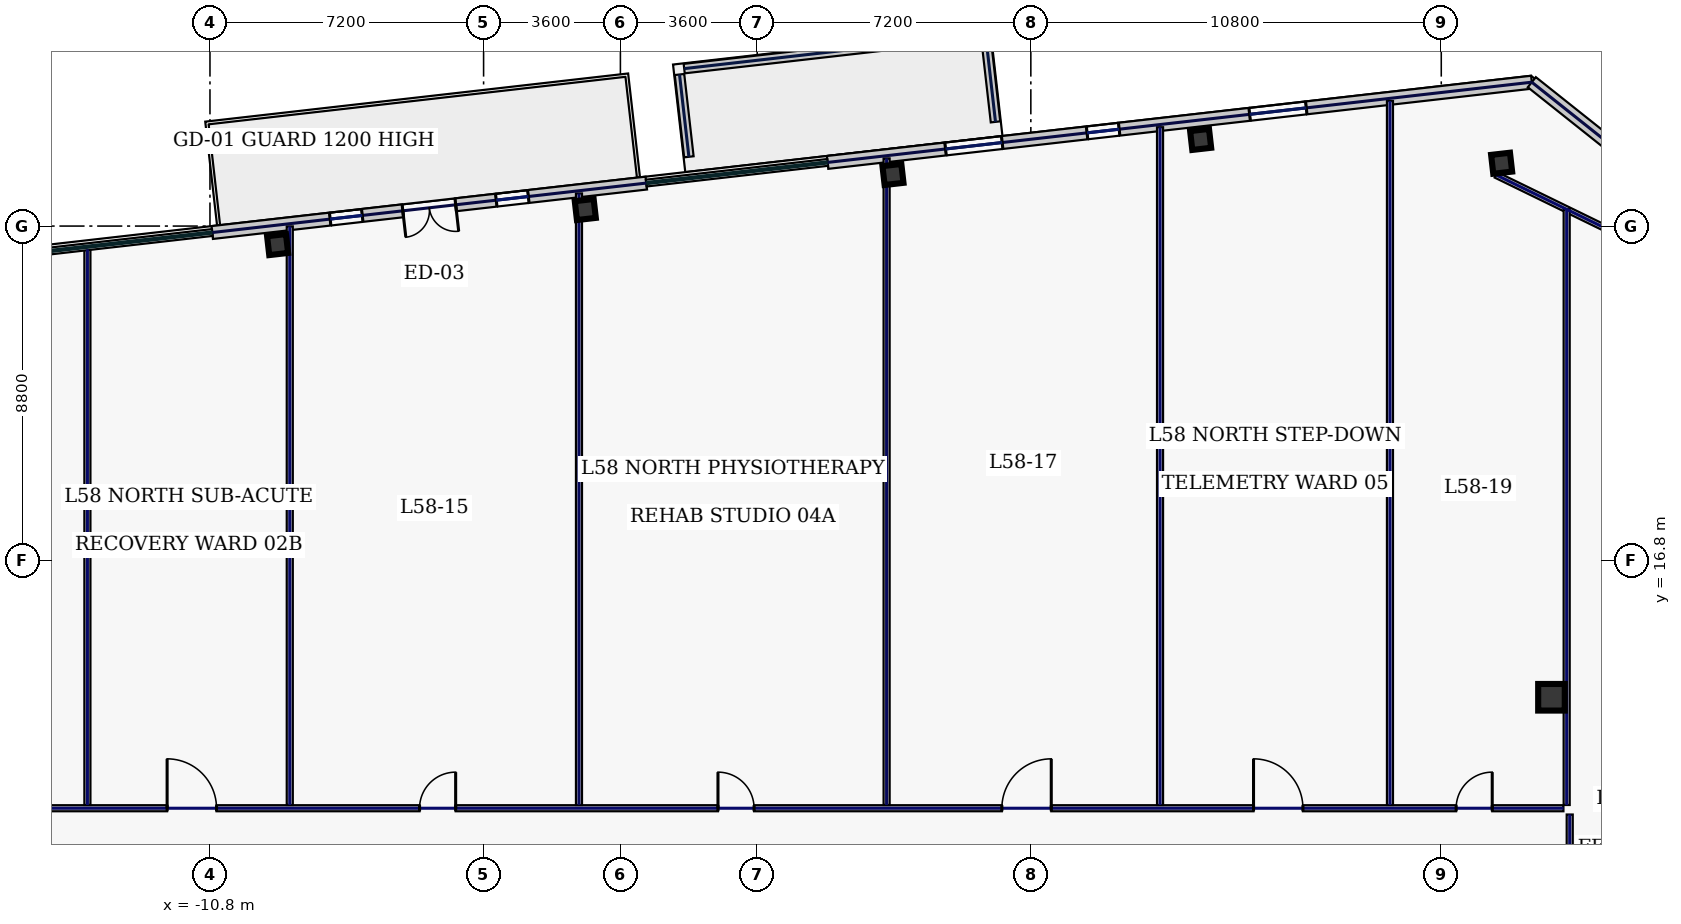
"""IFC4 building model, lengths in metres.
Left out: names, types, materials, properties, quantities, classifications, styles, units other than length and angle.
Written with IfcOpenShell. Run it as: python <this file> out.ifc"""

import sys

from ifc_helpers import new_model, si_unit, direction, frame, frame_2d, origin, origin_2d, place, context, subcontext, project, spatial, rectangle, hollow_rectangle, extrude, element, fill, save


model = new_model("IFC4")
c1 = context("Model", 3, precision=1e-05, world=origin(), true_north=direction((0.0, 1.0)))
c2 = subcontext(c1, "Body", "Model", "MODEL_VIEW")
j1 = project(units=[si_unit("LENGTHUNIT", "METRE"), si_unit("PLANEANGLEUNIT", "RADIAN")], contexts=[c1])
p1 = place(None, origin())
s1 = spatial("IfcSite", under=j1, at=p1, CompositionType="ELEMENT")
p2 = place(p1, origin())
s2 = spatial("IfcBuilding", under=s1, at=p2, CompositionType="ELEMENT")
p3 = place(p2, frame((0.0, 0.0, 251.0)))
s3 = spatial("IfcBuildingStorey", under=s2, at=p3, CompositionType="ELEMENT", Elevation=251.0)
p4 = place(p3, frame((24.5, 13.2, 0.0), z_axis=(0.0, 0.0, 1.0), x_axis=(1.0, 0.0, 0.0)))
e1 = element("IfcColumn", 1, at=p4, inside=s3, PredefinedType="COLUMN", context=c2, shape_type="SweptSolid", body=[
    extrude(hollow_rectangle(XDim=0.7, YDim=0.7, WallThickness=0.032, at=origin_2d()), origin(), (0.0, 0.0, 1.0), 3.74),
])
for number, where, z_axis, x_axis in (
    (2, (23.188, 27.253, 0.0), (0.0, 0.0, 1.0), (0.994, 0.113, 0.0)),
    (3, (15.269, 27.88, 0.0), (0.0, 0.0, 1.0), (0.994, 0.113, 0.0)),
    (4, (7.172, 26.958, 0.0), (0.0, 0.0, 1.0), (0.994, 0.113, 0.0)),
    (5, (-0.924, 26.035, 0.0), (0.0, 0.0, 1.0), (0.994, 0.113, 0.0)),
    (6, (-9.02, 25.113, 0.0), (0.0, 0.0, 1.0), (0.994, 0.113, 0.0)),
):
    element("IfcColumn", number, at=place(p3, frame(where, z_axis=z_axis, x_axis=x_axis)), inside=s3, PredefinedType="COLUMN", context=c2, shape_type="SweptSolid", body=[
        extrude(hollow_rectangle(XDim=0.5, YDim=0.5, WallThickness=0.025, at=origin_2d()), origin(), (0.0, 0.0, 1.0), 3.74),
    ])
p5 = place(p3, frame((1.802, 27.423, 0.0), z_axis=(0.0, 0.0, 1.0), x_axis=(-0.113221265394, 0.993569798787, 0.0)))
e7 = element("IfcWall", 7, at=p5, inside=s3, PredefinedType="PARAPET", context=c2, shape_type="SweptSolid", body=[
    extrude(rectangle(XDim=2.18, YDim=0.25, at=frame_2d((1.09, 0.0))), origin(), (0.0, 0.0, 1.0), 1.15),
])
p6 = place(p3, frame((1.679, 29.744, 0.0), z_axis=(0.0, 0.0, 1.0), x_axis=(0.993573058551, 0.113192655776, 0.0)))
e8 = element("IfcWall", 8, at=p6, inside=s3, PredefinedType="PARAPET", context=c2, shape_type="SweptSolid", body=[
    extrude(rectangle(XDim=7.84, YDim=0.25, at=frame_2d((3.92, 0.0))), origin(), (0.0, 0.0, 1.0), 1.15),
])
p7 = place(p3, frame((9.623, 30.508, 0.0), z_axis=(0.0, 0.0, 1.0), x_axis=(0.113221265394, -0.993569798787, 0.0)))
e9 = element("IfcWall", 9, at=p7, inside=s3, PredefinedType="PARAPET", context=c2, shape_type="SweptSolid", body=[
    extrude(rectangle(XDim=2.18, YDim=0.25, at=frame_2d((1.09, 0.0))), origin(), (0.0, 0.0, 1.0), 1.15),
])
p8 = place(p3, frame((23.983, 29.386, 0.0), z_axis=(0.0, 0.0, 1.0), x_axis=(-0.993572271362, -0.113199565282, 0.0)))
e10 = element("IfcWall", 10, at=p8, inside=s3, PredefinedType="STANDARD", context=c2, shape_type="SweptSolid", body=[
    extrude(rectangle(XDim=18.651, YDim=0.34, at=frame_2d((9.326, 0.0))), origin(), (0.0, 0.0, 1.0), 3.74),
])
p9 = place(p8, frame((14.027, 0.0, 0.83)))
e11 = element("IfcOpeningElement", 11, at=p9, cuts=e10, PredefinedType="OPENING", context=c2, shape_type="SweptSolid", body=[
    extrude(rectangle(XDim=1.5, YDim=2.0, at=frame_2d((0.75, 1.0))), frame((0.0, 0.18, 0.0), z_axis=(0.0, -1.0, 0.0), x_axis=(1.0, 0.0, 0.0)), (0.0, 0.0, 1.0), 0.36),
])
p10 = place(p8, frame((10.929, 0.0, 0.83)))
e12 = element("IfcOpeningElement", 12, at=p10, cuts=e10, PredefinedType="OPENING", context=c2, shape_type="SweptSolid", body=[
    extrude(rectangle(XDim=0.85, YDim=1.85, at=frame_2d((0.425, 0.925))), frame((0.0, 0.18, 0.0), z_axis=(0.0, -1.0, 0.0), x_axis=(1.0, 0.0, 0.0)), (0.0, 0.0, 1.0), 0.36),
])
p11 = place(p8, frame((5.973, 0.0, 0.83)))
e13 = element("IfcOpeningElement", 13, at=p11, cuts=e10, PredefinedType="OPENING", context=c2, shape_type="SweptSolid", body=[
    extrude(rectangle(XDim=1.5, YDim=2.0, at=frame_2d((0.75, 1.0))), frame((0.0, 0.18, 0.0), z_axis=(0.0, -1.0, 0.0), x_axis=(1.0, 0.0, 0.0)), (0.0, 0.0, 1.0), 0.36),
])
p12 = place(p3, frame((0.682, 26.731, 0.0), z_axis=(0.0, 0.0, 1.0), x_axis=(-0.993571968199, -0.113202226169, 0.0)))
e14 = element("IfcWall", 14, at=p12, inside=s3, PredefinedType="STANDARD", context=c2, shape_type="SweptSolid", body=[
    extrude(rectangle(XDim=11.497, YDim=0.34, at=frame_2d((5.749, 0.0))), origin(), (0.0, 0.0, 1.0), 3.74),
])
p13 = place(p12, frame((5.049, 0.0, 0.0)))
e15 = element("IfcOpeningElement", 15, at=p13, cuts=e14, PredefinedType="OPENING", context=c2, shape_type="SweptSolid", body=[
    extrude(rectangle(XDim=1.4, YDim=2.2, at=frame_2d((0.7, 1.1))), frame((0.0, 0.18, 0.0), z_axis=(0.0, -1.0, 0.0), x_axis=(1.0, 0.0, 0.0)), (0.0, 0.0, 1.0), 0.36),
])
p14 = place(p12, frame((7.523, 0.0, 0.83)))
e16 = element("IfcOpeningElement", 16, at=p14, cuts=e14, PredefinedType="OPENING", context=c2, shape_type="SweptSolid", body=[
    extrude(rectangle(XDim=0.85, YDim=1.85, at=frame_2d((0.425, 0.925))), frame((0.0, 0.18, 0.0), z_axis=(0.0, -1.0, 0.0), x_axis=(1.0, 0.0, 0.0)), (0.0, 0.0, 1.0), 0.36),
])
p15 = place(p12, frame((3.125, 0.0, 0.83)))
e17 = element("IfcOpeningElement", 17, at=p15, cuts=e14, PredefinedType="OPENING", context=c2, shape_type="SweptSolid", body=[
    extrude(rectangle(XDim=0.85, YDim=1.85, at=frame_2d((0.425, 0.925))), frame((0.0, 0.18, 0.0), z_axis=(0.0, -1.0, 0.0), x_axis=(1.0, 0.0, 0.0)), (0.0, 0.0, 1.0), 0.36),
])
p16 = place(p3, frame((29.107, 25.31, 0.0), z_axis=(0.0, 0.0, 1.0), x_axis=(-0.78259733853, 0.62252823689, 0.0)))
e18 = element("IfcWall", 18, at=p16, inside=s3, PredefinedType="STANDARD", context=c2, shape_type="SweptSolid", body=[
    extrude(rectangle(XDim=6.548, YDim=0.34, at=frame_2d((3.274, 0.0))), origin(), (0.0, 0.0, 1.0), 3.74),
])
p17 = place(p3, frame((28.528, 24.271, 0.0), z_axis=(0.0, 0.0, 1.0), x_axis=(-0.898820692789, 0.438316509173, 0.0)))
e19 = element("IfcWall", 19, at=p17, inside=s3, PredefinedType="PARTITIONING", context=c2, shape_type="SweptSolid", body=[
    extrude(rectangle(XDim=6.107, YDim=0.16, at=frame_2d((3.053, 0.0))), origin(), (0.0, 0.0, 1.0), 3.74),
])
p18 = place(p3, frame((-24.815, 10.28, 0.0), z_axis=(0.0, 0.0, 1.0), x_axis=(1.0, 0.0, 0.0)))
e20 = element("IfcWall", 20, at=p18, inside=s3, PredefinedType="PARTITIONING", context=c2, shape_type="SweptSolid", body=[
    extrude(rectangle(XDim=49.63, YDim=0.16, at=frame_2d((24.815, 0.0))), origin(), (0.0, 0.0, 1.0), 3.74),
])
p19 = place(p18, frame((1.869, 0.0, 0.0)))
e21 = element("IfcOpeningElement", 21, at=p19, cuts=e20, PredefinedType="OPENING", context=c2, shape_type="SweptSolid", body=[
    extrude(rectangle(XDim=1.3, YDim=2.2, at=frame_2d((0.65, 1.1))), frame((0.0, 0.09, 0.0), z_axis=(0.0, -1.0, 0.0), x_axis=(1.0, 0.0, 0.0)), (0.0, 0.0, 1.0), 0.18),
])
p20 = place(p18, frame((7.288, 0.0, 0.0)))
e22 = element("IfcOpeningElement", 22, at=p20, cuts=e20, PredefinedType="OPENING", context=c2, shape_type="SweptSolid", body=[
    extrude(rectangle(XDim=1.05, YDim=2.2, at=frame_2d((0.525, 1.1))), frame((0.0, 0.09, 0.0), z_axis=(0.0, -1.0, 0.0), x_axis=(1.0, 0.0, 0.0)), (0.0, 0.0, 1.0), 0.18),
])
p21 = place(p18, frame((12.887, 0.0, 0.0)))
e23 = element("IfcOpeningElement", 23, at=p21, cuts=e20, PredefinedType="OPENING", context=c2, shape_type="SweptSolid", body=[
    extrude(rectangle(XDim=1.3, YDim=2.2, at=frame_2d((0.65, 1.1))), frame((0.0, 0.09, 0.0), z_axis=(0.0, -1.0, 0.0), x_axis=(1.0, 0.0, 0.0)), (0.0, 0.0, 1.0), 0.18),
])
p22 = place(p18, frame((19.53, 0.0, 0.0)))
e24 = element("IfcOpeningElement", 24, at=p22, cuts=e20, PredefinedType="OPENING", context=c2, shape_type="SweptSolid", body=[
    extrude(rectangle(XDim=0.95, YDim=2.2, at=frame_2d((0.475, 1.1))), frame((0.0, 0.09, 0.0), z_axis=(0.0, -1.0, 0.0), x_axis=(1.0, 0.0, 0.0)), (0.0, 0.0, 1.0), 0.18),
])
p23 = place(p18, frame((27.383, 0.0, 0.0)))
e25 = element("IfcOpeningElement", 25, at=p23, cuts=e20, PredefinedType="OPENING", context=c2, shape_type="SweptSolid", body=[
    extrude(rectangle(XDim=0.95, YDim=2.2, at=frame_2d((0.475, 1.1))), frame((0.0, 0.09, 0.0), z_axis=(0.0, -1.0, 0.0), x_axis=(1.0, 0.0, 0.0)), (0.0, 0.0, 1.0), 0.18),
])
p24 = place(p18, frame((34.853, 0.0, 0.0)))
e26 = element("IfcOpeningElement", 26, at=p24, cuts=e20, PredefinedType="OPENING", context=c2, shape_type="SweptSolid", body=[
    extrude(rectangle(XDim=1.3, YDim=2.2, at=frame_2d((0.65, 1.1))), frame((0.0, 0.09, 0.0), z_axis=(0.0, -1.0, 0.0), x_axis=(1.0, 0.0, 0.0)), (0.0, 0.0, 1.0), 0.18),
])
p25 = place(p18, frame((41.475, 0.0, 0.0)))
e27 = element("IfcOpeningElement", 27, at=p25, cuts=e20, PredefinedType="OPENING", context=c2, shape_type="SweptSolid", body=[
    extrude(rectangle(XDim=1.3, YDim=2.2, at=frame_2d((0.65, 1.1))), frame((0.0, 0.09, 0.0), z_axis=(0.0, -1.0, 0.0), x_axis=(1.0, 0.0, 0.0)), (0.0, 0.0, 1.0), 0.18),
])
p26 = place(p18, frame((46.806, 0.0, 0.0)))
e28 = element("IfcOpeningElement", 28, at=p26, cuts=e20, PredefinedType="OPENING", context=c2, shape_type="SweptSolid", body=[
    extrude(rectangle(XDim=0.95, YDim=2.2, at=frame_2d((0.475, 1.1))), frame((0.0, 0.09, 0.0), z_axis=(0.0, -1.0, 0.0), x_axis=(1.0, 0.0, 0.0)), (0.0, 0.0, 1.0), 0.18),
])
p27 = place(p3, frame((24.98, 10.115, 0.0), z_axis=(0.0, 0.0, 1.0), x_axis=(0.0, -1.0, 0.0)))
e29 = element("IfcWall", 29, at=p27, inside=s3, PredefinedType="PARTITIONING", context=c2, shape_type="SweptSolid", body=[
    extrude(rectangle(XDim=20.13, YDim=0.16, at=frame_2d((10.065, 0.0))), origin(), (0.0, 0.0, 1.0), 3.74),
])
p28 = place(p27, frame((17.181, 0.0, 0.0)))
e30 = element("IfcOpeningElement", 30, at=p28, cuts=e29, PredefinedType="OPENING", context=c2, shape_type="SweptSolid", body=[
    extrude(rectangle(XDim=0.95, YDim=2.2, at=frame_2d((0.475, 1.1))), frame((0.0, 0.09, 0.0), z_axis=(0.0, -1.0, 0.0), x_axis=(1.0, 0.0, 0.0)), (0.0, 0.0, 1.0), 0.18),
])
p29 = place(p27, frame((12.325, 0.0, 0.0)))
e31 = element("IfcOpeningElement", 31, at=p29, cuts=e29, PredefinedType="OPENING", context=c2, shape_type="SweptSolid", body=[
    extrude(rectangle(XDim=0.95, YDim=2.2, at=frame_2d((0.475, 1.1))), frame((0.0, 0.09, 0.0), z_axis=(0.0, -1.0, 0.0), x_axis=(1.0, 0.0, 0.0)), (0.0, 0.0, 1.0), 0.18),
])
p30 = place(p27, frame((7.125, 0.0, 0.0)))
e32 = element("IfcOpeningElement", 32, at=p30, cuts=e29, PredefinedType="OPENING", context=c2, shape_type="SweptSolid", body=[
    extrude(rectangle(XDim=0.95, YDim=2.2, at=frame_2d((0.475, 1.1))), frame((0.0, 0.09, 0.0), z_axis=(0.0, -1.0, 0.0), x_axis=(1.0, 0.0, 0.0)), (0.0, 0.0, 1.0), 0.18),
])
p31 = place(p27, frame((2.219, 0.0, 0.0)))
e33 = element("IfcOpeningElement", 33, at=p31, cuts=e29, PredefinedType="OPENING", context=c2, shape_type="SweptSolid", body=[
    extrude(rectangle(XDim=0.95, YDim=2.2, at=frame_2d((0.475, 1.1))), frame((0.0, 0.09, 0.0), z_axis=(0.0, -1.0, 0.0), x_axis=(1.0, 0.0, 0.0)), (0.0, 0.0, 1.0), 0.18),
])
p32 = place(p3, frame((24.9, 10.365, 0.0), z_axis=(0.0, 0.0, 1.0), x_axis=(0.0, 1.0, 0.0)))
e34 = element("IfcWall", 34, at=p32, inside=s3, PredefinedType="PARTITIONING", context=c2, shape_type="SweptSolid", body=[
    extrude(rectangle(XDim=15.679, YDim=0.16, at=frame_2d((7.84, 0.0))), origin(), (0.0, 0.0, 1.0), 3.74),
])
p33 = place(p3, frame((-8.7, 10.365, 0.0), z_axis=(0.0, 0.0, 1.0), x_axis=(0.0, 1.0, 0.0)))
e35 = element("IfcWall", 35, at=p33, inside=s3, PredefinedType="PARTITIONING", context=c2, shape_type="SweptSolid", body=[
    extrude(rectangle(XDim=15.227, YDim=0.16, at=frame_2d((7.614, 0.0))), origin(), (0.0, 0.0, 1.0), 3.74),
])
p34 = place(p3, frame((-1.09, 10.365, 0.0), z_axis=(0.0, 0.0, 1.0), x_axis=(0.0, 1.0, 0.0)))
e36 = element("IfcWall", 36, at=p34, inside=s3, PredefinedType="PARTITIONING", context=c2, shape_type="SweptSolid", body=[
    extrude(rectangle(XDim=16.094, YDim=0.16, at=frame_2d((8.047, 0.0))), origin(), (0.0, 0.0, 1.0), 3.285),
])
p35 = place(p3, frame((14.2, 10.365, 0.0), z_axis=(0.0, 0.0, 1.0), x_axis=(0.0, 1.0, 0.0)))
e37 = element("IfcWall", 37, at=p35, inside=s3, PredefinedType="PARTITIONING", context=c2, shape_type="SweptSolid", body=[
    extrude(rectangle(XDim=17.836, YDim=0.16, at=frame_2d((8.918, 0.0))), origin(), (0.0, 0.0, 1.0), 3.74),
])
p36 = place(p3, frame((20.25, 10.365, 0.0), z_axis=(0.0, 0.0, 1.0), x_axis=(0.0, 1.0, 0.0)))
e38 = element("IfcWall", 38, at=p36, inside=s3, PredefinedType="PARTITIONING", context=c2, shape_type="SweptSolid", body=[
    extrude(rectangle(XDim=18.525, YDim=0.16, at=frame_2d((9.263, 0.0))), origin(), (0.0, 0.0, 1.0), 3.74),
])
p37 = place(p3, frame((-14.025, 10.365, 0.0), z_axis=(0.0, 0.0, 1.0), x_axis=(0.0, 1.0, 0.0)))
e39 = element("IfcWall", 39, at=p37, inside=s3, PredefinedType="PARTITIONING", context=c2, shape_type="SweptSolid", body=[
    extrude(rectangle(XDim=14.62, YDim=0.16, at=frame_2d((7.31, 0.0))), origin(), (0.0, 0.0, 1.0), 3.74),
])
p38 = place(p3, frame((7.005, 10.365, 0.0), z_axis=(0.0, 0.0, 1.0), x_axis=(0.0, 1.0, 0.0)))
e40 = element("IfcWall", 40, at=p38, inside=s3, PredefinedType="PARTITIONING", context=c2, shape_type="SweptSolid", body=[
    extrude(rectangle(XDim=17.016, YDim=0.16, at=frame_2d((8.508, 0.0))), origin(), (0.0, 0.0, 1.0), 3.285),
])
p39 = place(p9, origin())
e41 = element("IfcWindow", 41, at=p39, inside=s3, PartitioningType="SINGLE_PANEL", PredefinedType="WINDOW", context=c2, shape_type="SweptSolid", body=[
    extrude(rectangle(XDim=1.5, YDim=2.0, at=frame_2d((0.75, 1.0))), frame((0.0, 0.03, 0.0), z_axis=(0.0, -1.0, 0.0), x_axis=(1.0, 0.0, 0.0)), (0.0, 0.0, 1.0), 0.06),
])
fill(e11, e41)
p40 = place(p10, origin())
e42 = element("IfcWindow", 42, at=p40, inside=s3, PartitioningType="SINGLE_PANEL", PredefinedType="WINDOW", context=c2, shape_type="SweptSolid", body=[
    extrude(rectangle(XDim=0.85, YDim=1.85, at=frame_2d((0.425, 0.925))), frame((0.0, 0.03, 0.0), z_axis=(0.0, -1.0, 0.0), x_axis=(1.0, 0.0, 0.0)), (0.0, 0.0, 1.0), 0.06),
])
fill(e12, e42)
p41 = place(p11, origin())
e43 = element("IfcWindow", 43, at=p41, inside=s3, PartitioningType="SINGLE_PANEL", PredefinedType="WINDOW", context=c2, shape_type="SweptSolid", body=[
    extrude(rectangle(XDim=1.5, YDim=2.0, at=frame_2d((0.75, 1.0))), frame((0.0, 0.03, 0.0), z_axis=(0.0, -1.0, 0.0), x_axis=(1.0, 0.0, 0.0)), (0.0, 0.0, 1.0), 0.06),
])
fill(e13, e43)
p42 = place(p13, origin())
e44 = element("IfcDoor", 44, at=p42, inside=s3, OperationType="DOUBLE_SWING_LEFT", PredefinedType="DOOR", context=c2, shape_type="SweptSolid", body=[
    extrude(rectangle(XDim=1.4, YDim=2.2, at=frame_2d((0.7, 1.1))), frame((0.0, 0.025, 0.0), z_axis=(0.0, -1.0, 0.0), x_axis=(1.0, 0.0, 0.0)), (0.0, 0.0, 1.0), 0.05),
])
fill(e15, e44)
p43 = place(p14, origin())
e45 = element("IfcWindow", 45, at=p43, inside=s3, PartitioningType="SINGLE_PANEL", PredefinedType="WINDOW", context=c2, shape_type="SweptSolid", body=[
    extrude(rectangle(XDim=0.85, YDim=1.85, at=frame_2d((0.425, 0.925))), frame((0.0, 0.03, 0.0), z_axis=(0.0, -1.0, 0.0), x_axis=(1.0, 0.0, 0.0)), (0.0, 0.0, 1.0), 0.06),
])
fill(e16, e45)
p44 = place(p15, origin())
e46 = element("IfcWindow", 46, at=p44, inside=s3, PartitioningType="SINGLE_PANEL", PredefinedType="WINDOW", context=c2, shape_type="SweptSolid", body=[
    extrude(rectangle(XDim=0.85, YDim=1.85, at=frame_2d((0.425, 0.925))), frame((0.0, 0.03, 0.0), z_axis=(0.0, -1.0, 0.0), x_axis=(1.0, 0.0, 0.0)), (0.0, 0.0, 1.0), 0.06),
])
fill(e17, e46)
p45 = place(p21, origin())
e47 = element("IfcDoor", 47, at=p45, inside=s3, OperationType="SINGLE_SWING_LEFT", PredefinedType="DOOR", context=c2, shape_type="SweptSolid", body=[
    extrude(rectangle(XDim=1.3, YDim=2.2, at=frame_2d((0.65, 1.1))), frame((0.0, 0.025, 0.0), z_axis=(0.0, -1.0, 0.0), x_axis=(1.0, 0.0, 0.0)), (0.0, 0.0, 1.0), 0.05),
])
fill(e23, e47)
p46 = place(p22, origin())
e48 = element("IfcDoor", 48, at=p46, inside=s3, OperationType="SINGLE_SWING_RIGHT", PredefinedType="DOOR", context=c2, shape_type="SweptSolid", body=[
    extrude(rectangle(XDim=0.95, YDim=2.2, at=frame_2d((0.475, 1.1))), frame((0.0, 0.025, 0.0), z_axis=(0.0, -1.0, 0.0), x_axis=(1.0, 0.0, 0.0)), (0.0, 0.0, 1.0), 0.05),
])
fill(e24, e48)
p47 = place(p23, origin())
e49 = element("IfcDoor", 49, at=p47, inside=s3, OperationType="SINGLE_SWING_LEFT", PredefinedType="DOOR", context=c2, shape_type="SweptSolid", body=[
    extrude(rectangle(XDim=0.95, YDim=2.2, at=frame_2d((0.475, 1.1))), frame((0.0, 0.025, 0.0), z_axis=(0.0, -1.0, 0.0), x_axis=(1.0, 0.0, 0.0)), (0.0, 0.0, 1.0), 0.05),
])
fill(e25, e49)
p48 = place(p24, origin())
e50 = element("IfcDoor", 50, at=p48, inside=s3, OperationType="SINGLE_SWING_RIGHT", PredefinedType="DOOR", context=c2, shape_type="SweptSolid", body=[
    extrude(rectangle(XDim=1.3, YDim=2.2, at=frame_2d((0.65, 1.1))), frame((0.0, 0.025, 0.0), z_axis=(0.0, -1.0, 0.0), x_axis=(1.0, 0.0, 0.0)), (0.0, 0.0, 1.0), 0.05),
])
fill(e26, e50)
p49 = place(p25, origin())
e51 = element("IfcDoor", 51, at=p49, inside=s3, OperationType="SINGLE_SWING_LEFT", PredefinedType="DOOR", context=c2, shape_type="SweptSolid", body=[
    extrude(rectangle(XDim=1.3, YDim=2.2, at=frame_2d((0.65, 1.1))), frame((0.0, 0.025, 0.0), z_axis=(0.0, -1.0, 0.0), x_axis=(1.0, 0.0, 0.0)), (0.0, 0.0, 1.0), 0.05),
])
fill(e27, e51)
p50 = place(p26, origin())
e52 = element("IfcDoor", 52, at=p50, inside=s3, OperationType="SINGLE_SWING_RIGHT", PredefinedType="DOOR", context=c2, shape_type="SweptSolid", body=[
    extrude(rectangle(XDim=0.95, YDim=2.2, at=frame_2d((0.475, 1.1))), frame((0.0, 0.025, 0.0), z_axis=(0.0, -1.0, 0.0), x_axis=(1.0, 0.0, 0.0)), (0.0, 0.0, 1.0), 0.05),
])
fill(e28, e52)
save(model, sys.argv[1])
